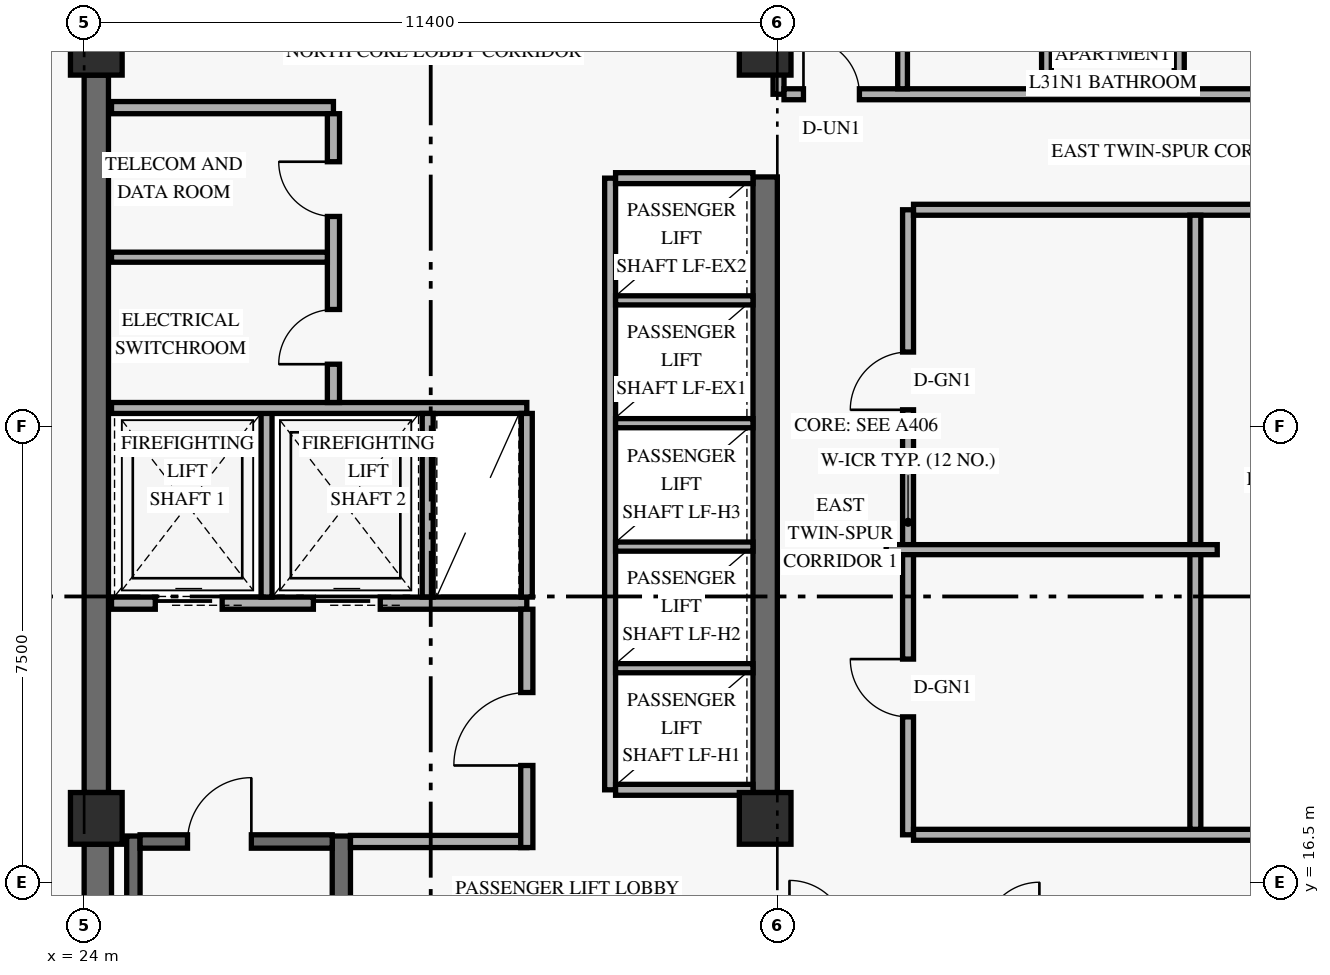
"""IFC4 building model, lengths in metres.
Left out: names, types, materials, properties, quantities, classifications, styles, units other than length and angle.
Written with IfcOpenShell. Run it as: python <this file> out.ifc"""

import sys

from ifc_helpers import new_model, si_unit, direction, frame, frame_2d, origin, origin_2d, place, context, subcontext, project, spatial, rectangle, extrude, element, fill, save


model = new_model("IFC4")
c1 = context("Model", 3, precision=1e-05, world=origin(), true_north=direction((0.0, 1.0)))
c2 = subcontext(c1, "Body", "Model", "MODEL_VIEW")
j1 = project(units=[si_unit("LENGTHUNIT", "METRE"), si_unit("PLANEANGLEUNIT", "RADIAN")], contexts=[c1])
p1 = place(None, origin())
s1 = spatial("IfcSite", under=j1, at=p1, CompositionType="ELEMENT")
p2 = place(p1, origin())
s2 = spatial("IfcBuilding", under=s1, at=p2, CompositionType="ELEMENT")
p3 = place(p2, frame((0.0, 0.0, 121.2)))
s3 = spatial("IfcBuildingStorey", under=s2, at=p3, CompositionType="ELEMENT", Elevation=121.2)
p4 = place(p3, frame((24.225, 9.675, 0.0), z_axis=(0.0, 0.0, 1.0), x_axis=(0.0, 1.0, 0.0)))
e1 = element("IfcWall", 1, at=p4, inside=s3, PredefinedType="SHEAR", context=c2, shape_type="SweptSolid", body=[
    extrude(rectangle(XDim=7.45, YDim=0.45, at=frame_2d((3.725, 0.0))), origin(), (0.0, 0.0, 1.0), 2.749),
])
p5 = place(p3, frame((24.2, 17.975, 0.0), z_axis=(0.0, 0.0, 1.0), x_axis=(0.0, 1.0, 0.0)))
e2 = element("IfcWall", 2, at=p5, inside=s3, PredefinedType="SHEAR", context=c2, shape_type="SweptSolid", body=[
    extrude(rectangle(XDim=11.8, YDim=0.4, at=frame_2d((5.9, 0.0))), origin(), (0.0, 0.0, 1.0), 2.749),
])
p6 = place(p3, frame((35.2, 17.975, 0.0), z_axis=(0.0, 0.0, 1.0), x_axis=(0.0, 1.0, 0.0)))
e3 = element("IfcWall", 3, at=p6, inside=s3, PredefinedType="SHEAR", context=c2, shape_type="SweptSolid", body=[
    extrude(rectangle(XDim=10.125, YDim=0.4, at=frame_2d((5.062, 0.0))), origin(), (0.0, 0.0, 1.0), 2.749),
])
p7 = place(p3, frame((24.81, 9.5, 0.0), z_axis=(0.0, 0.0, 1.0), x_axis=(0.0, 1.0, 0.0)))
e4 = element("IfcWall", 4, at=p7, inside=s3, PredefinedType="SHEAR", context=c2, shape_type="SweptSolid", body=[
    extrude(rectangle(XDim=7.76, YDim=0.22, at=frame_2d((3.88, 0.0))), origin(), (0.0, 0.0, 1.0), 3.36),
])
p8 = place(p3, frame((28.23, 9.5, 0.0), z_axis=(0.0, 0.0, 1.0), x_axis=(0.0, 1.0, 0.0)))
e5 = element("IfcWall", 5, at=p8, inside=s3, PredefinedType="SHEAR", context=c2, shape_type="SweptSolid", body=[
    extrude(rectangle(XDim=7.76, YDim=0.3, at=frame_2d((3.88, 0.0))), origin(), (0.0, 0.0, 1.0), 3.36),
])
p9 = place(p3, frame((24.92, 17.17, 0.0), z_axis=(0.0, 0.0, 1.0), x_axis=(1.0, 0.0, 0.0)))
e6 = element("IfcWall", 6, at=p9, inside=s3, PredefinedType="SHEAR", context=c2, shape_type="SweptSolid", body=[
    extrude(rectangle(XDim=3.16, YDim=0.22, at=frame_2d((1.58, 0.0))), origin(), (0.0, 0.0, 1.0), 3.36),
])
p10 = place(p9, frame((0.78, 0.0, 0.0)))
e7 = element("IfcOpeningElement", 7, at=p10, cuts=e6, PredefinedType="OPENING", context=c2, shape_type="SweptSolid", body=[
    extrude(rectangle(XDim=1.05, YDim=2.15, at=frame_2d((0.525, 1.075))), frame((0.0, 0.12, 0.0), z_axis=(0.0, -1.0, 0.0), x_axis=(1.0, 0.0, 0.0)), (0.0, 0.0, 1.0), 0.24),
])
for number, where, z_axis, x_axis in (
    (8, (24.2, 17.55, 0.0), (0.0, 0.0, 1.0), (1.0, 0.0, 0.0)),
    (9, (24.2, 30.2, 0.0), (0.0, 0.0, 1.0), (1.0, 0.0, 0.0)),
    (10, (35.2, 17.55, 0.0), (0.0, 0.0, 1.0), (1.0, 0.0, 0.0)),
    (11, (35.2, 30.2, 0.0), (0.0, 0.0, 1.0), (1.0, 0.0, 0.0)),
):
    element("IfcColumn", number, at=place(p3, frame(where, z_axis=z_axis, x_axis=x_axis)), inside=s3, PredefinedType="COLUMN", context=c2, shape_type="SweptSolid", body=[
        extrude(rectangle(XDim=0.85, YDim=0.85, at=origin_2d()), origin(), (0.0, 0.0, 1.0), 3.6),
    ])
p11 = place(p3, frame((24.45, 21.09, 0.0), z_axis=(0.0, 0.0, 1.0), x_axis=(1.0, 0.0, 0.0)))
e12 = element("IfcWall", 12, at=p11, inside=s3, PredefinedType="STANDARD", context=c2, shape_type="SweptSolid", body=[
    extrude(rectangle(XDim=6.83, YDim=0.2, at=frame_2d((3.415, 0.0))), origin(), (0.0, 0.0, 1.0), 3.36),
])
p12 = place(p11, frame((0.72, 0.0, 0.0)))
e13 = element("IfcOpeningElement", 13, at=p12, cuts=e12, PredefinedType="OPENING", context=c2, shape_type="SweptSolid", body=[
    extrude(rectangle(XDim=1.1, YDim=2.2, at=frame_2d((0.55, 1.1))), frame((0.0, 0.11, 0.0), z_axis=(0.0, -1.0, 0.0), x_axis=(1.0, 0.0, 0.0)), (0.0, 0.0, 1.0), 0.22),
])
p13 = place(p11, frame((3.32, 0.0, 0.0)))
e14 = element("IfcOpeningElement", 14, at=p13, cuts=e12, PredefinedType="OPENING", context=c2, shape_type="SweptSolid", body=[
    extrude(rectangle(XDim=1.1, YDim=2.2, at=frame_2d((0.55, 1.1))), frame((0.0, 0.11, 0.0), z_axis=(0.0, -1.0, 0.0), x_axis=(1.0, 0.0, 0.0)), (0.0, 0.0, 1.0), 0.22),
])
p14 = place(p3, frame((28.38, 17.17, 0.0), z_axis=(0.0, 0.0, 1.0), x_axis=(1.0, 0.0, 0.0)))
e15 = element("IfcWall", 15, at=p14, inside=s3, PredefinedType="STANDARD", context=c2, shape_type="SweptSolid", body=[
    extrude(rectangle(XDim=2.9, YDim=0.2, at=frame_2d((1.45, 0.0))), origin(), (0.0, 0.0, 1.0), 3.36),
])
p15 = place(p3, frame((31.28, 17.07, 0.0), z_axis=(0.0, 0.0, 1.0), x_axis=(0.0, 1.0, 0.0)))
e16 = element("IfcWall", 16, at=p15, inside=s3, PredefinedType="STANDARD", context=c2, shape_type="SweptSolid", body=[
    extrude(rectangle(XDim=3.92, YDim=0.2, at=frame_2d((1.96, 0.0))), origin(), (0.0, 0.0, 1.0), 2.731),
])
p16 = place(p15, frame((1.35, 0.0, 0.0)))
e17 = element("IfcOpeningElement", 17, at=p16, cuts=e16, PredefinedType="OPENING", context=c2, shape_type="SweptSolid", body=[
    extrude(rectangle(XDim=1.2, YDim=2.15, at=frame_2d((0.6, 1.075))), frame((0.0, 0.11, 0.0), z_axis=(0.0, -1.0, 0.0), x_axis=(1.0, 0.0, 0.0)), (0.0, 0.0, 1.0), 0.22),
])
p17 = place(p3, frame((27.0, 21.19, 0.0), z_axis=(0.0, 0.0, 1.0), x_axis=(0.0, 1.0, 0.0)))
e18 = element("IfcWall", 18, at=p17, inside=s3, PredefinedType="STANDARD", context=c2, shape_type="SweptSolid", body=[
    extrude(rectangle(XDim=3.11, YDim=0.18, at=frame_2d((1.555, 0.0))), origin(), (0.0, 0.0, 1.0), 3.36),
])
p18 = place(p3, frame((24.45, 24.3, 0.0), z_axis=(0.0, 0.0, 1.0), x_axis=(1.0, 0.0, 0.0)))
e19 = element("IfcWall", 19, at=p18, inside=s3, PredefinedType="STANDARD", context=c2, shape_type="SweptSolid", body=[
    extrude(rectangle(XDim=6.83, YDim=0.18, at=frame_2d((3.415, 0.0))), origin(), (0.0, 0.0, 1.0), 3.36),
])
for number, where, z_axis, x_axis in (
    (20, (29.65, 21.19, 0.0), (0.0, 0.0, 1.0), (0.0, 1.0, 0.0)),
    (21, (31.28, 21.19, 0.0), (0.0, 0.0, 1.0), (0.0, 1.0, 0.0)),
):
    element("IfcWall", number, at=place(p3, frame(where, z_axis=z_axis, x_axis=x_axis)), inside=s3, PredefinedType="STANDARD", context=c2, shape_type="SweptSolid", body=[
        extrude(rectangle(XDim=3.02, YDim=0.18, at=frame_2d((1.51, 0.0))), origin(), (0.0, 0.0, 1.0), 3.36),
    ])
p19 = place(p3, frame((24.45, 29.24, 0.0), z_axis=(0.0, 0.0, 1.0), x_axis=(1.0, 0.0, 0.0)))
e22 = element("IfcWall", 22, at=p19, inside=s3, PredefinedType="STANDARD", context=c2, shape_type="SweptSolid", body=[
    extrude(rectangle(XDim=3.65, YDim=0.2, at=frame_2d((1.825, 0.0))), origin(), (0.0, 0.0, 1.0), 3.36),
])
p20 = place(p3, frame((28.1, 24.39, 0.0), z_axis=(0.0, 0.0, 1.0), x_axis=(0.0, 1.0, 0.0)))
e23 = element("IfcWall", 23, at=p20, inside=s3, PredefinedType="STANDARD", context=c2, shape_type="SweptSolid", body=[
    extrude(rectangle(XDim=4.75, YDim=0.2, at=frame_2d((2.375, 0.0))), origin(), (0.0, 0.0, 1.0), 3.36),
])
p21 = place(p20, frame((0.63, 0.0, 0.0)))
e24 = element("IfcOpeningElement", 24, at=p21, cuts=e23, PredefinedType="OPENING", context=c2, shape_type="SweptSolid", body=[
    extrude(rectangle(XDim=0.9, YDim=2.1, at=frame_2d((0.45, 1.05))), frame((0.0, 0.11, 0.0), z_axis=(0.0, -1.0, 0.0), x_axis=(1.0, 0.0, 0.0)), (0.0, 0.0, 1.0), 0.22),
])
p22 = place(p20, frame((3.06, 0.0, 0.0)))
e25 = element("IfcOpeningElement", 25, at=p22, cuts=e23, PredefinedType="OPENING", context=c2, shape_type="SweptSolid", body=[
    extrude(rectangle(XDim=0.9, YDim=2.1, at=frame_2d((0.45, 1.05))), frame((0.0, 0.11, 0.0), z_axis=(0.0, -1.0, 0.0), x_axis=(1.0, 0.0, 0.0)), (0.0, 0.0, 1.0), 0.22),
])
p23 = place(p3, frame((24.45, 26.78, 0.0), z_axis=(0.0, 0.0, 1.0), x_axis=(1.0, 0.0, 0.0)))
e26 = element("IfcWall", 26, at=p23, inside=s3, PredefinedType="PARTITIONING", context=c2, shape_type="SweptSolid", body=[
    extrude(rectangle(XDim=3.55, YDim=0.165, at=frame_2d((1.775, 0.0))), origin(), (0.0, 0.0, 1.0), 3.36),
])
p24 = place(p3, frame((32.65, 18.02, 0.0), z_axis=(0.0, 0.0, 1.0), x_axis=(0.0, 1.0, 0.0)))
e27 = element("IfcWall", 27, at=p24, inside=s3, PredefinedType="STANDARD", context=c2, shape_type="SweptSolid", body=[
    extrude(rectangle(XDim=10.06, YDim=0.18, at=frame_2d((5.03, 0.0))), origin(), (0.0, 0.0, 1.0), 3.36),
])
for number, where, z_axis, x_axis in (
    (28, (32.74, 18.02, 0.0), (0.0, 0.0, 1.0), (1.0, 0.0, 0.0)),
    (29, (32.74, 28.08, 0.0), (0.0, 0.0, 1.0), (1.0, 0.0, 0.0)),
):
    element("IfcWall", number, at=place(p3, frame(where, z_axis=z_axis, x_axis=x_axis)), inside=s3, PredefinedType="STANDARD", context=c2, shape_type="SweptSolid", body=[
        extrude(rectangle(XDim=2.26, YDim=0.18, at=frame_2d((1.13, 0.0))), origin(), (0.0, 0.0, 1.0), 3.36),
    ])
for number, where, z_axis, x_axis in (
    (30, (32.74, 20.02, 0.0), (0.0, 0.0, 1.0), (1.0, 0.0, 0.0)),
    (31, (32.74, 22.02, 0.0), (0.0, 0.0, 1.0), (1.0, 0.0, 0.0)),
    (32, (32.74, 24.05, 0.0), (0.0, 0.0, 1.0), (1.0, 0.0, 0.0)),
    (33, (32.74, 26.07, 0.0), (0.0, 0.0, 1.0), (1.0, 0.0, 0.0)),
):
    element("IfcWall", number, at=place(p3, frame(where, z_axis=z_axis, x_axis=x_axis)), inside=s3, PredefinedType="STANDARD", context=c2, shape_type="SweptSolid", body=[
        extrude(rectangle(XDim=2.26, YDim=0.15, at=frame_2d((1.13, 0.0))), origin(), (0.0, 0.0, 1.0), 3.36),
    ])
p25 = place(p3, frame((37.55, 17.28, 0.0), z_axis=(0.0, 0.0, 1.0), x_axis=(0.0, 1.0, 0.0)))
e34 = element("IfcWall", 34, at=p25, inside=s3, PredefinedType="STANDARD", context=c2, shape_type="SweptSolid", body=[
    extrude(rectangle(XDim=10.28, YDim=0.18, at=frame_2d((5.14, 0.0))), origin(), (0.0, 0.0, 1.0), 2.731),
])
p26 = place(p25, frame((1.94, 0.0, 0.0)))
e35 = element("IfcOpeningElement", 35, at=p26, cuts=e34, PredefinedType="OPENING", context=c2, shape_type="SweptSolid", body=[
    extrude(rectangle(XDim=0.95, YDim=2.15, at=frame_2d((0.475, 1.075))), frame((0.0, 0.1, 0.0), z_axis=(0.0, -1.0, 0.0), x_axis=(1.0, 0.0, 0.0)), (0.0, 0.0, 1.0), 0.2),
])
p27 = place(p25, frame((6.99, 0.0, 0.0)))
e36 = element("IfcOpeningElement", 36, at=p27, cuts=e34, PredefinedType="OPENING", context=c2, shape_type="SweptSolid", body=[
    extrude(rectangle(XDim=0.95, YDim=2.15, at=frame_2d((0.475, 1.075))), frame((0.0, 0.1, 0.0), z_axis=(0.0, -1.0, 0.0), x_axis=(1.0, 0.0, 0.0)), (0.0, 0.0, 1.0), 0.2),
])
p28 = place(p3, frame((37.64, 17.28, 0.0), z_axis=(0.0, 0.0, 1.0), x_axis=(1.0, 0.0, 0.0)))
e37 = element("IfcWall", 37, at=p28, inside=s3, PredefinedType="STANDARD", context=c2, shape_type="SweptSolid", body=[
    extrude(rectangle(XDim=9.36, YDim=0.18, at=frame_2d((4.68, 0.0))), origin(), (0.0, 0.0, 1.0), 2.731),
])
p29 = place(p28, frame((7.238, 0.0, 0.0)))
e38 = element("IfcOpeningElement", 38, at=p29, cuts=e37, PredefinedType="OPENING", context=c2, shape_type="SweptSolid", body=[
    extrude(rectangle(XDim=0.92, YDim=2.15, at=frame_2d((0.46, 1.075))), frame((0.0, 0.1, 0.0), z_axis=(0.0, -1.0, 0.0), x_axis=(1.0, 0.0, 0.0)), (0.0, 0.0, 1.0), 0.2),
])
p30 = place(p3, frame((37.64, 27.56, 0.0), z_axis=(0.0, 0.0, 1.0), x_axis=(1.0, 0.0, 0.0)))
e39 = element("IfcWall", 39, at=p30, inside=s3, PredefinedType="STANDARD", context=c2, shape_type="SweptSolid", body=[
    extrude(rectangle(XDim=9.36, YDim=0.18, at=frame_2d((4.68, 0.0))), origin(), (0.0, 0.0, 1.0), 2.731),
])
p31 = place(p3, frame((35.42, 29.46, 0.0), z_axis=(0.0, 0.0, 1.0), x_axis=(0.0, 1.0, 0.0)))
e40 = element("IfcWall", 40, at=p31, inside=s3, PredefinedType="STANDARD", context=c2, shape_type="SweptSolid", body=[
    extrude(rectangle(XDim=1.89, YDim=0.18, at=frame_2d((0.945, 0.0))), origin(), (0.0, 0.0, 1.0), 2.731),
])
p32 = place(p3, frame((35.51, 29.46, 0.0), z_axis=(0.0, 0.0, 1.0), x_axis=(1.0, 0.0, 0.0)))
e41 = element("IfcWall", 41, at=p32, inside=s3, PredefinedType="STANDARD", context=c2, shape_type="SweptSolid", body=[
    extrude(rectangle(XDim=11.49, YDim=0.18, at=frame_2d((5.745, 0.0))), origin(), (0.0, 0.0, 1.0), 2.731),
])
p33 = place(p32, frame((0.32, 0.0, 0.0)))
e42 = element("IfcOpeningElement", 42, at=p33, cuts=e41, PredefinedType="OPENING", context=c2, shape_type="SweptSolid", body=[
    extrude(rectangle(XDim=0.92, YDim=2.15, at=frame_2d((0.46, 1.075))), frame((0.0, 0.1, 0.0), z_axis=(0.0, -1.0, 0.0), x_axis=(1.0, 0.0, 0.0)), (0.0, 0.0, 1.0), 0.2),
])
p34 = place(p3, frame((42.01, 29.55, 0.0), z_axis=(0.0, 0.0, 1.0), x_axis=(0.0, 1.0, 0.0)))
e43 = element("IfcWall", 43, at=p34, inside=s3, PredefinedType="PARTITIONING", context=c2, shape_type="SweptSolid", body=[
    extrude(rectangle(XDim=15.47, YDim=0.165, at=frame_2d((7.735, 0.0))), origin(), (0.0, 0.0, 1.0), 2.731),
])
p35 = place(p34, frame((4.917, 0.0, 0.0)))
e44 = element("IfcOpeningElement", 44, at=p35, cuts=e43, PredefinedType="OPENING", context=c2, shape_type="SweptSolid", body=[
    extrude(rectangle(XDim=0.88, YDim=2.14, at=frame_2d((0.44, 1.07))), frame((0.0, 0.093, 0.0), z_axis=(0.0, -1.0, 0.0), x_axis=(1.0, 0.0, 0.0)), (0.0, 0.0, 1.0), 0.185),
])
p36 = place(p34, frame((9.255, 0.0, 0.0)))
e45 = element("IfcOpeningElement", 45, at=p36, cuts=e43, PredefinedType="OPENING", context=c2, shape_type="SweptSolid", body=[
    extrude(rectangle(XDim=0.88, YDim=2.14, at=frame_2d((0.44, 1.07))), frame((0.0, 0.093, 0.0), z_axis=(0.0, -1.0, 0.0), x_axis=(1.0, 0.0, 0.0)), (0.0, 0.0, 1.0), 0.185),
])
p37 = place(p3, frame((37.46, 29.55, 0.0), z_axis=(0.0, 0.0, 1.0), x_axis=(0.0, 1.0, 0.0)))
e46 = element("IfcWall", 46, at=p37, inside=s3, PredefinedType="PLUMBINGWALL", context=c2, shape_type="SweptSolid", body=[
    extrude(rectangle(XDim=2.625, YDim=0.16, at=frame_2d((1.312, 0.0))), origin(), (0.0, 0.0, 1.0), 2.731),
])
p38 = place(p3, frame((39.826, 29.55, 0.0), z_axis=(0.0, 0.0, 1.0), x_axis=(0.0, 1.0, 0.0)))
e47 = element("IfcWall", 47, at=p38, inside=s3, PredefinedType="PLUMBINGWALL", context=c2, shape_type="SweptSolid", body=[
    extrude(rectangle(XDim=2.465, YDim=0.16, at=frame_2d((1.232, 0.0))), origin(), (0.0, 0.0, 1.0), 2.731),
])
p39 = place(p3, frame((42.275, 17.37, 0.0), z_axis=(0.0, 0.0, 1.0), x_axis=(0.0, 1.0, 0.0)))
e48 = element("IfcWall", 48, at=p39, inside=s3, PredefinedType="PARTITIONING", context=c2, shape_type="SweptSolid", body=[
    extrude(rectangle(XDim=10.1, YDim=0.18, at=frame_2d((5.05, 0.0))), origin(), (0.0, 0.0, 1.0), 2.731),
])
p40 = place(p3, frame((37.19, 21.97, 0.0), z_axis=(0.0, 0.0, 1.0), x_axis=(1.0, 0.0, 0.0)))
e49 = element("IfcWall", 49, at=p40, inside=s3, PredefinedType="PARTITIONING", context=c2, shape_type="SweptSolid", body=[
    extrude(rectangle(XDim=5.445, YDim=0.165, at=frame_2d((2.723, 0.0))), origin(), (0.0, 0.0, 1.0), 3.36),
])
p41 = place(p10, frame((1.05, 0.0, 0.0), z_axis=(0.0, 0.0, 1.0), x_axis=(-1.0, 0.0, 0.0)))
e50 = element("IfcDoor", 50, at=p41, inside=s3, OperationType="SINGLE_SWING_LEFT", PredefinedType="DOOR", context=c2, shape_type="SweptSolid", body=[
    extrude(rectangle(XDim=1.05, YDim=2.15, at=frame_2d((0.525, 1.075))), frame((0.0, 0.025, 0.0), z_axis=(0.0, -1.0, 0.0), x_axis=(1.0, 0.0, 0.0)), (0.0, 0.0, 1.0), 0.05),
])
fill(e7, e50)
p42 = place(p12, origin())
e51 = element("IfcDoor", 51, at=p42, inside=s3, OperationType="SLIDING_TO_LEFT", PredefinedType="DOOR", context=c2, shape_type="SweptSolid", body=[
    extrude(rectangle(XDim=1.1, YDim=2.2, at=frame_2d((0.55, 1.1))), frame((0.0, 0.025, 0.0), z_axis=(0.0, -1.0, 0.0), x_axis=(1.0, 0.0, 0.0)), (0.0, 0.0, 1.0), 0.05),
])
fill(e13, e51)
p43 = place(p13, origin())
e52 = element("IfcDoor", 52, at=p43, inside=s3, OperationType="SLIDING_TO_LEFT", PredefinedType="DOOR", context=c2, shape_type="SweptSolid", body=[
    extrude(rectangle(XDim=1.1, YDim=2.2, at=frame_2d((0.55, 1.1))), frame((0.0, 0.025, 0.0), z_axis=(0.0, -1.0, 0.0), x_axis=(1.0, 0.0, 0.0)), (0.0, 0.0, 1.0), 0.05),
])
fill(e14, e52)
p44 = place(p16, origin())
e53 = element("IfcDoor", 53, at=p44, inside=s3, OperationType="SINGLE_SWING_LEFT", PredefinedType="DOOR", context=c2, shape_type="SweptSolid", body=[
    extrude(rectangle(XDim=1.2, YDim=2.15, at=frame_2d((0.6, 1.075))), frame((0.0, 0.025, 0.0), z_axis=(0.0, -1.0, 0.0), x_axis=(1.0, 0.0, 0.0)), (0.0, 0.0, 1.0), 0.05),
])
fill(e17, e53)
p45 = place(p21, origin())
e54 = element("IfcDoor", 54, at=p45, inside=s3, OperationType="SINGLE_SWING_LEFT", PredefinedType="DOOR", context=c2, shape_type="SweptSolid", body=[
    extrude(rectangle(XDim=0.9, YDim=2.1, at=frame_2d((0.45, 1.05))), frame((0.0, 0.025, 0.0), z_axis=(0.0, -1.0, 0.0), x_axis=(1.0, 0.0, 0.0)), (0.0, 0.0, 1.0), 0.05),
])
fill(e24, e54)
p46 = place(p22, origin())
e55 = element("IfcDoor", 55, at=p46, inside=s3, OperationType="SINGLE_SWING_RIGHT", PredefinedType="DOOR", context=c2, shape_type="SweptSolid", body=[
    extrude(rectangle(XDim=0.9, YDim=2.1, at=frame_2d((0.45, 1.05))), frame((0.0, 0.025, 0.0), z_axis=(0.0, -1.0, 0.0), x_axis=(1.0, 0.0, 0.0)), (0.0, 0.0, 1.0), 0.05),
])
fill(e25, e55)
p47 = place(p33, origin())
e56 = element("IfcDoor", 56, at=p47, inside=s3, OperationType="SINGLE_SWING_LEFT", PredefinedType="DOOR", context=c2, shape_type="SweptSolid", body=[
    extrude(rectangle(XDim=0.92, YDim=2.15, at=frame_2d((0.46, 1.075))), frame((0.0, 0.025, 0.0), z_axis=(0.0, -1.0, 0.0), x_axis=(1.0, 0.0, 0.0)), (0.0, 0.0, 1.0), 0.05),
])
fill(e42, e56)
p48 = place(p26, origin())
e57 = element("IfcDoor", 57, at=p48, inside=s3, OperationType="SINGLE_SWING_RIGHT", PredefinedType="DOOR", context=c2, shape_type="SweptSolid", body=[
    extrude(rectangle(XDim=0.95, YDim=2.15, at=frame_2d((0.475, 1.075))), frame((0.0, 0.025, 0.0), z_axis=(0.0, -1.0, 0.0), x_axis=(1.0, 0.0, 0.0)), (0.0, 0.0, 1.0), 0.05),
])
fill(e35, e57)
p49 = place(p27, origin())
e58 = element("IfcDoor", 58, at=p49, inside=s3, OperationType="SINGLE_SWING_LEFT", PredefinedType="DOOR", context=c2, shape_type="SweptSolid", body=[
    extrude(rectangle(XDim=0.95, YDim=2.15, at=frame_2d((0.475, 1.075))), frame((0.0, 0.025, 0.0), z_axis=(0.0, -1.0, 0.0), x_axis=(1.0, 0.0, 0.0)), (0.0, 0.0, 1.0), 0.05),
])
fill(e36, e58)
save(model, sys.argv[1])
